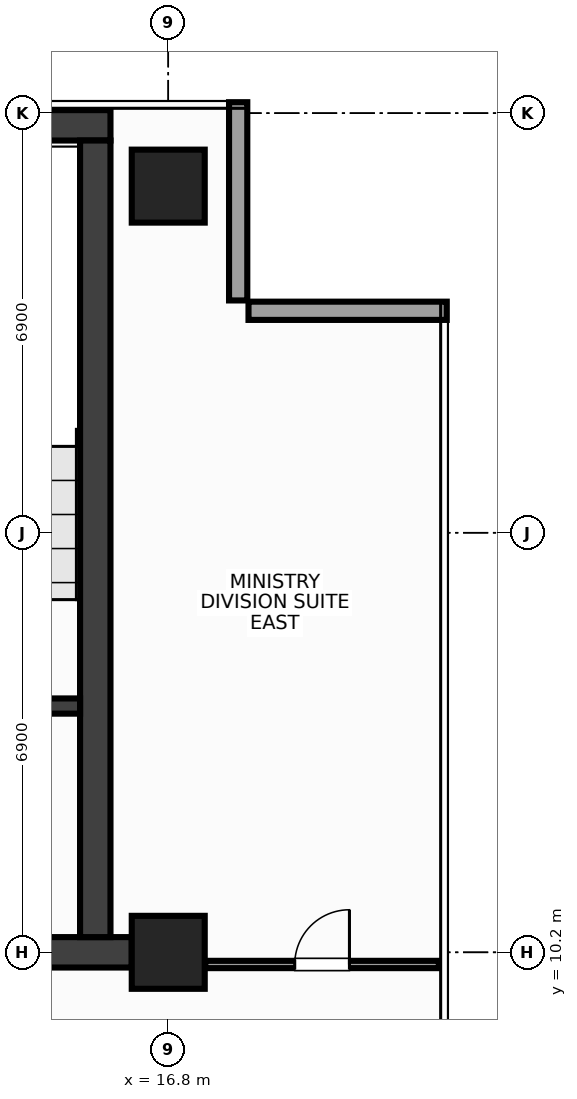
"""IFC4 building model, lengths in metres.
Left out: names, types, materials, properties, quantities, classifications, styles, units other than length and angle.
Written with IfcOpenShell. Run it as: python <this file> out.ifc"""

import sys

from ifc_helpers import new_model, si_unit, direction, frame, frame_2d, origin, origin_2d, place, context, subcontext, project, spatial, rectangle, extrude, source, transform, mapped, element, fill, save


model = new_model("IFC4")
c1 = context("Model", 3, precision=1e-05, world=origin(), true_north=direction((0.0, 1.0)))
c2 = subcontext(c1, "Body", "Model", "MODEL_VIEW")
j1 = project(units=[si_unit("LENGTHUNIT", "METRE"), si_unit("PLANEANGLEUNIT", "RADIAN")], contexts=[c1])
p1 = place(None, origin())
s1 = spatial("IfcSite", under=j1, at=p1, CompositionType="ELEMENT")
p2 = place(p1, origin())
s2 = spatial("IfcBuilding", under=s1, at=p2, CompositionType="ELEMENT")
p3 = place(p2, frame((0.0, 0.0, 275.6)))
s3 = spatial("IfcBuildingStorey", under=s2, at=p3, CompositionType="ELEMENT", Elevation=275.6)
m1 = source(origin(), c2, "Body", "SweptSolid", [
    extrude(rectangle(XDim=31.7, YDim=0.5, at=frame_2d((15.85, 0.0))), origin(), (0.0, 0.0, 1.0), 3.6),
])
p4 = place(p3, frame((-15.85, 23.8, 0.0), z_axis=(0.0, 0.0, 1.0), x_axis=(1.0, 0.0, 0.0)))
e1 = element("IfcWall", 1, at=p4, inside=s3, PredefinedType="SHEAR", context=c2, shape_type="MappedRepresentation", body=[
    mapped(m1, transform((0.0, 0.0, 0.0), x_axis=(1.0, 0.0, 0.0), y_axis=(0.0, 1.0, 0.0), z_axis=(0.0, 0.0, 1.0), scale=1.0)),
])
m2 = source(origin(), c2, "Body", "SweptSolid", [
    extrude(rectangle(XDim=32.4, YDim=0.5, at=frame_2d((16.2, 0.0))), origin(), (0.0, 0.0, 1.0), 3.6),
])
p5 = place(p3, frame((-16.2, 10.2, 0.0), z_axis=(0.0, 0.0, 1.0), x_axis=(1.0, 0.0, 0.0)))
e2 = element("IfcWall", 2, at=p5, inside=s3, PredefinedType="SHEAR", context=c2, shape_type="MappedRepresentation", body=[
    mapped(m2, transform((0.0, 0.0, 0.0), x_axis=(1.0, 0.0, 0.0), y_axis=(0.0, 1.0, 0.0), z_axis=(0.0, 0.0, 1.0), scale=1.0)),
])
p6 = place(p5, frame((2.05, 0.0, 0.0)))
e3 = element("IfcOpeningElement", 3, at=p6, cuts=e2, PredefinedType="OPENING", context=c2, shape_type="SweptSolid", body=[
    extrude(rectangle(XDim=1.6, YDim=2.15, at=frame_2d((0.8, 1.075))), frame((0.0, 0.262, 0.0), z_axis=(0.0, -1.0, 0.0), x_axis=(1.0, 0.0, 0.0)), (0.0, 0.0, 1.0), 0.524),
])
p7 = place(p5, frame((28.75, 0.0, 0.0)))
e4 = element("IfcOpeningElement", 4, at=p7, cuts=e2, PredefinedType="OPENING", context=c2, shape_type="SweptSolid", body=[
    extrude(rectangle(XDim=1.6, YDim=2.15, at=frame_2d((0.8, 1.075))), frame((0.0, 0.262, 0.0), z_axis=(0.0, -1.0, 0.0), x_axis=(1.0, 0.0, 0.0)), (0.0, 0.0, 1.0), 0.524),
])
p8 = place(p5, frame((15.45, 0.0, 0.0)))
e5 = element("IfcOpeningElement", 5, at=p8, cuts=e2, PredefinedType="OPENING", context=c2, shape_type="SweptSolid", body=[
    extrude(rectangle(XDim=1.5, YDim=2.2, at=frame_2d((0.75, 1.1))), frame((0.0, 0.262, 0.0), z_axis=(0.0, -1.0, 0.0), x_axis=(1.0, 0.0, 0.0)), (0.0, 0.0, 1.0), 0.524),
])
m3 = source(origin(), c2, "Body", "SweptSolid", [
    extrude(rectangle(XDim=13.1, YDim=0.5, at=frame_2d((6.55, 0.0))), origin(), (0.0, 0.0, 1.0), 3.6),
])
p9 = place(p3, frame((15.6, 10.45, 0.0), z_axis=(0.0, 0.0, 1.0), x_axis=(0.0, 1.0, 0.0)))
e6 = element("IfcWall", 6, at=p9, inside=s3, PredefinedType="SHEAR", context=c2, shape_type="MappedRepresentation", body=[
    mapped(m3, transform((0.0, 0.0, 0.0), x_axis=(1.0, 0.0, 0.0), y_axis=(0.0, 1.0, 0.0), z_axis=(0.0, 0.0, 1.0), scale=1.0)),
])
m4 = source(origin(), c2, "Body", "SweptSolid", [
    extrude(rectangle(XDim=3.705, YDim=0.25, at=frame_2d((1.853, 0.0))), origin(), (0.0, 0.0, 1.0), 3.6),
])
p10 = place(p3, frame((11.645, 14.25, 0.0), z_axis=(0.0, 0.0, 1.0), x_axis=(1.0, 0.0, 0.0)))
e7 = element("IfcWall", 7, at=p10, inside=s3, PredefinedType="SHEAR", context=c2, shape_type="MappedRepresentation", body=[
    mapped(m4, transform((0.0, 0.0, 0.0), x_axis=(1.0, 0.0, 0.0), y_axis=(0.0, 1.0, 0.0), z_axis=(0.0, 0.0, 1.0), scale=1.0)),
])
p11 = place(p10, frame((0.95, 0.0, 0.0)))
e8 = element("IfcOpeningElement", 8, at=p11, cuts=e7, PredefinedType="OPENING", context=c2, shape_type="SweptSolid", body=[
    extrude(rectangle(XDim=1.6, YDim=2.15, at=frame_2d((0.8, 1.075))), frame((0.0, 0.137, 0.0), z_axis=(0.0, -1.0, 0.0), x_axis=(1.0, 0.0, 0.0)), (0.0, 0.0, 1.0), 0.274),
])
m5 = source(origin(), c2, "Body", "SweptSolid", [
    extrude(rectangle(XDim=1.2, YDim=1.2, at=origin_2d()), origin(), (0.0, 0.0, 1.0), 3.6),
])
for number, where, z_axis, x_axis in (
    (9, (16.8, 10.2, 0.0), (0.0, 0.0, 1.0), (1.0, 0.0, 0.0)),
    (10, (16.8, 22.8, 0.0), (0.0, 0.0, 1.0), (1.0, 0.0, 0.0)),
):
    element("IfcColumn", number, at=place(p3, frame(where, z_axis=z_axis, x_axis=x_axis)), inside=s3, PredefinedType="COLUMN", context=c2, shape_type="MappedRepresentation", body=[
        mapped(m5, transform((0.0, 0.0, 0.0), x_axis=(1.0, 0.0, 0.0), y_axis=(0.0, 1.0, 0.0), z_axis=(0.0, 0.0, 1.0), scale=1.0)),
    ])
m6 = source(origin(), c2, "Body", "SweptSolid", [
    extrude(rectangle(XDim=3.26, YDim=0.3, at=frame_2d((1.63, 0.0))), origin(), (0.0, 0.0, 1.0), 2.75),
])
p12 = place(p3, frame((21.38, 20.75, 0.0), z_axis=(0.0, 0.0, 1.0), x_axis=(-1.0, 0.0, 0.0)))
e11 = element("IfcWall", 11, at=p12, inside=s3, PredefinedType="STANDARD", context=c2, shape_type="MappedRepresentation", body=[
    mapped(m6, transform((0.0, 0.0, 0.0), x_axis=(1.0, 0.0, 0.0), y_axis=(0.0, 1.0, 0.0), z_axis=(0.0, 0.0, 1.0), scale=1.0)),
])
m7 = source(origin(), c2, "Body", "SweptSolid", [
    extrude(rectangle(XDim=3.26, YDim=0.3, at=frame_2d((1.63, 0.0))), origin(), (0.0, 0.0, 1.0), 2.75),
])
p13 = place(p3, frame((17.95, 20.92, 0.0), z_axis=(0.0, 0.0, 1.0), x_axis=(0.0, 1.0, 0.0)))
e12 = element("IfcWall", 12, at=p13, inside=s3, PredefinedType="STANDARD", context=c2, shape_type="MappedRepresentation", body=[
    mapped(m7, transform((0.0, 0.0, 0.0), x_axis=(1.0, 0.0, 0.0), y_axis=(0.0, 1.0, 0.0), z_axis=(0.0, 0.0, 1.0), scale=1.0)),
])
m8 = source(origin(), c2, "Body", "SweptSolid", [
    extrude(rectangle(XDim=3.84, YDim=0.12, at=frame_2d((1.92, 0.0))), origin(), (0.0, 0.0, 1.0), 2.805),
])
p14 = place(p3, frame((17.41, 10.0, 0.0), z_axis=(0.0, 0.0, 1.0), x_axis=(1.0, 0.0, 0.0)))
e13 = element("IfcWall", 13, at=p14, inside=s3, PredefinedType="PARTITIONING", context=c2, shape_type="MappedRepresentation", body=[
    mapped(m8, transform((0.0, 0.0, 0.0), x_axis=(1.0, 0.0, 0.0), y_axis=(0.0, 1.0, 0.0), z_axis=(0.0, 0.0, 1.0), scale=1.0)),
])
p15 = place(p14, frame((1.47, 0.0, 0.0)))
e14 = element("IfcOpeningElement", 14, at=p15, cuts=e13, PredefinedType="OPENING", context=c2, shape_type="SweptSolid", body=[
    extrude(rectangle(XDim=0.9, YDim=2.15, at=frame_2d((0.45, 1.075))), frame((0.0, 0.072, 0.0), z_axis=(0.0, -1.0, 0.0), x_axis=(1.0, 0.0, 0.0)), (0.0, 0.0, 1.0), 0.144),
])
m9 = source(origin(), c2, "Body", "SweptSolid", [
    extrude(rectangle(XDim=0.9, YDim=2.15, at=frame_2d((0.45, 1.075))), frame((0.0, 0.025, 0.0), z_axis=(0.0, -1.0, 0.0), x_axis=(1.0, 0.0, 0.0)), (0.0, 0.0, 1.0), 0.05),
])
p16 = place(p15, origin())
e15 = element("IfcDoor", 15, at=p16, inside=s3, OperationType="SINGLE_SWING_RIGHT", PredefinedType="DOOR", context=c2, shape_type="MappedRepresentation", body=[
    mapped(m9, transform((0.0, 0.0, 0.0), x_axis=(1.0, 0.0, 0.0), y_axis=(0.0, 1.0, 0.0), z_axis=(0.0, 0.0, 1.0), scale=1.0)),
])
fill(e14, e15)
save(model, sys.argv[1])
